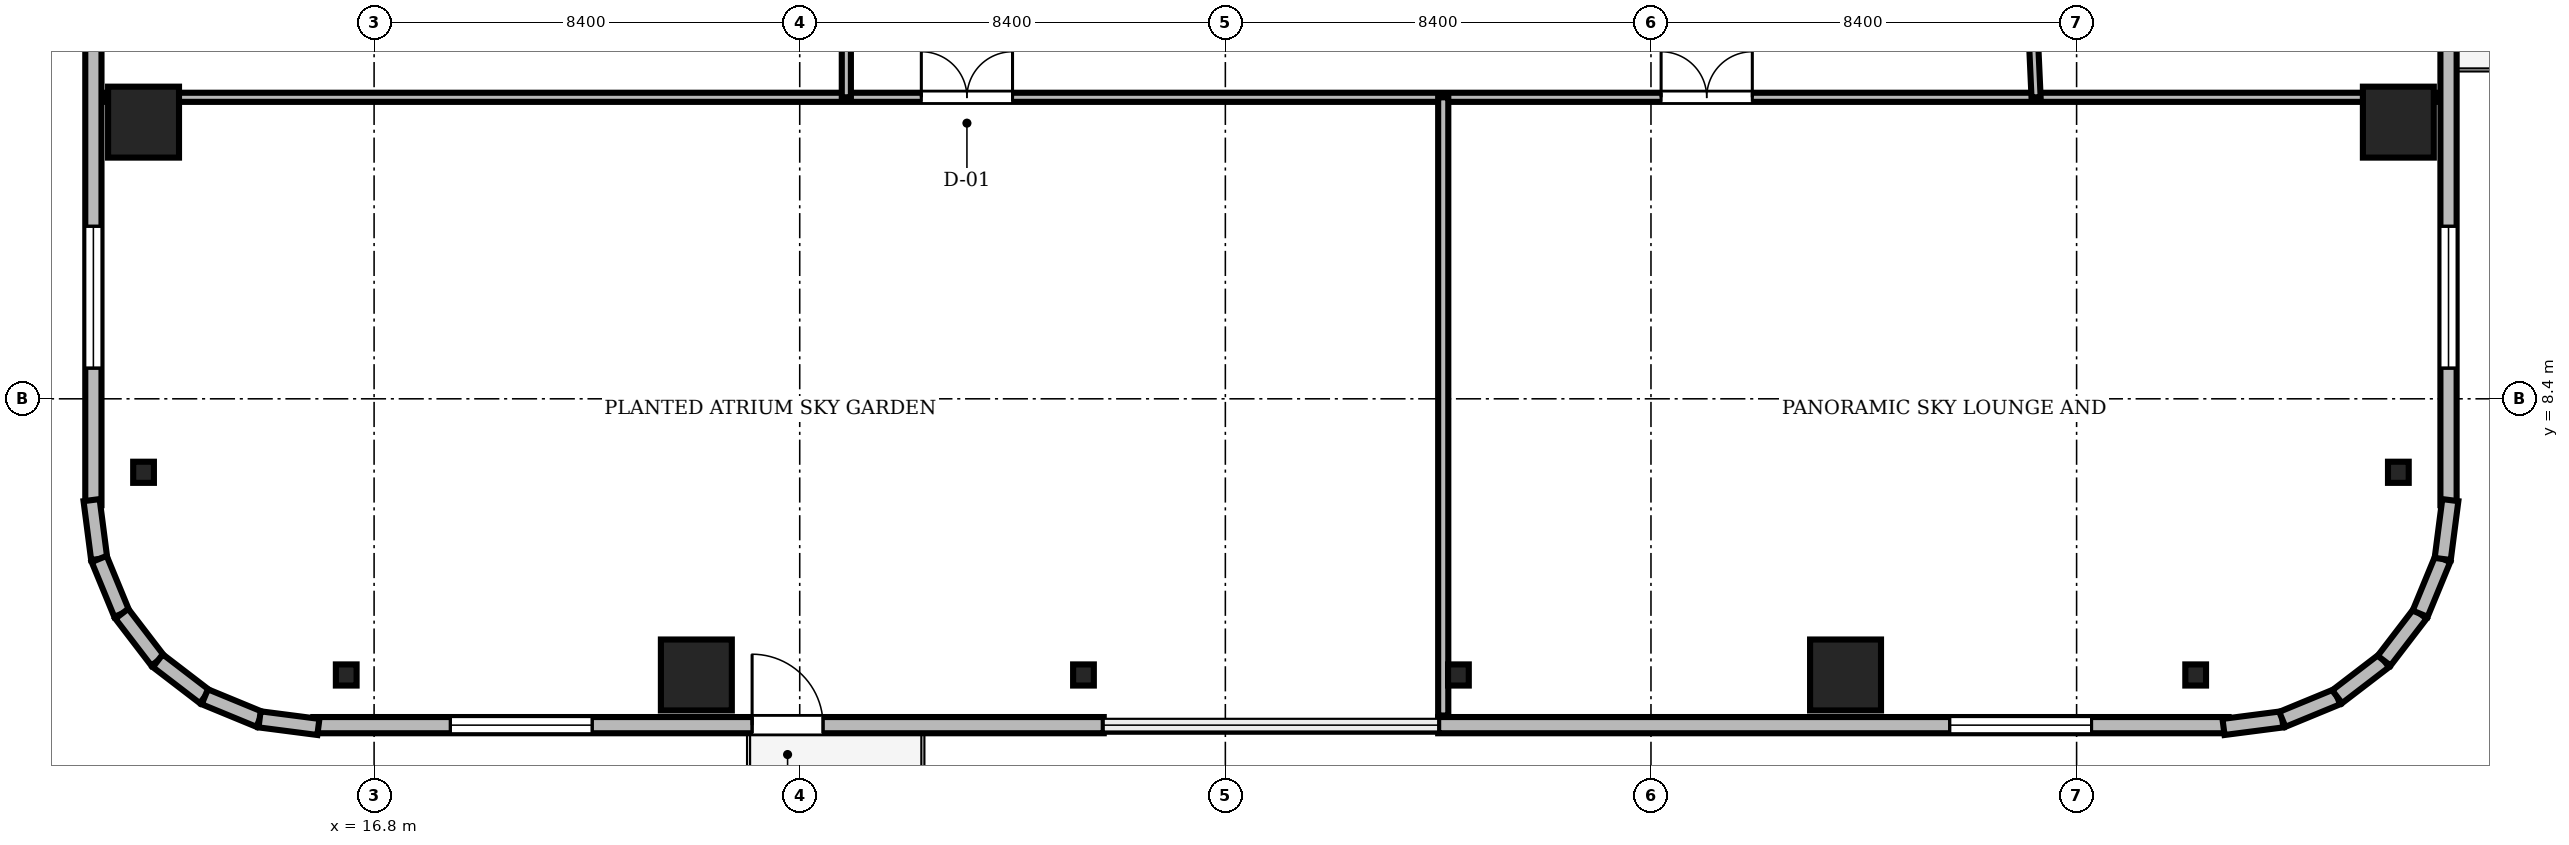
"""IFC4 building model, lengths in metres.
Left out: names, types, materials, properties, quantities, classifications, styles, units other than length and angle.
Written with IfcOpenShell. Run it as: python <this file> out.ifc"""

import sys

from ifc_helpers import new_model, si_unit, direction, frame, frame_2d, origin, origin_2d, place, context, subcontext, project, spatial, rectangle, i_section, extrude, source, transform, mapped, element, fill, save


model = new_model("IFC4")
c1 = context("Model", 3, precision=1e-05, world=origin(), true_north=direction((0.0, 1.0)))
c2 = subcontext(c1, "Body", "Model", "MODEL_VIEW")
j1 = project(units=[si_unit("LENGTHUNIT", "METRE"), si_unit("PLANEANGLEUNIT", "RADIAN")], contexts=[c1])
p1 = place(None, origin())
s1 = spatial("IfcSite", under=j1, at=p1, CompositionType="ELEMENT")
p2 = place(p1, origin())
s2 = spatial("IfcBuilding", under=s1, at=p2, CompositionType="ELEMENT")
p3 = place(p2, frame((0.0, 0.0, 172.2)))
s3 = spatial("IfcBuildingStorey", under=s2, at=p3, CompositionType="ELEMENT", Elevation=172.2)
m1 = source(origin(), c2, "Body", "SweptSolid", [
    extrude(rectangle(XDim=1.4, YDim=1.4, at=origin_2d()), origin(), (0.0, 0.0, 1.0), 4.78),
])
for number, where, z_axis, x_axis in (
    (1, (23.16, 2.95, 0.0), (0.0, 0.0, 1.0), (1.0, 0.0, 0.0)),
    (2, (45.84, 2.95, 0.0), (0.0, 0.0, 1.0), (1.0, 0.0, 0.0)),
    (3, (56.75, 13.86, 0.0), (0.0, 0.0, 1.0), (1.0, 0.0, 0.0)),
    (4, (12.25, 13.86, 0.0), (0.0, 0.0, 1.0), (1.0, 0.0, 0.0)),
):
    element("IfcColumn", number, at=place(p3, frame(where, z_axis=z_axis, x_axis=x_axis)), inside=s3, PredefinedType="COLUMN", context=c2, shape_type="MappedRepresentation", body=[
        mapped(m1, transform((0.0, 0.0, 0.0), scale=1.0)),
    ])
m2 = source(origin(), c2, "Body", "SweptSolid", [
    extrude(i_section(OverallWidth=0.409, OverallDepth=0.417, WebThickness=0.021, FlangeThickness=0.033, FilletRadius=0.015, at=origin_2d()), origin(), (0.0, 0.0, 1.0), 4.78),
])
for number, where, z_axis, x_axis in (
    (5, (16.25, 2.95, 0.0), (0.0, 0.0, 1.0), (1.0, 0.0, 0.0)),
    (6, (30.8, 2.95, 0.0), (0.0, 0.0, 1.0), (1.0, 0.0, 0.0)),
    (7, (38.2, 2.95, 0.0), (0.0, 0.0, 1.0), (1.0, 0.0, 0.0)),
    (8, (52.75, 2.95, 0.0), (0.0, 0.0, 1.0), (1.0, 0.0, 0.0)),
    (9, (56.75, 6.95, 0.0), (0.0, 0.0, 1.0), (1.0, 0.0, 0.0)),
    (10, (12.25, 6.95, 0.0), (0.0, 0.0, 1.0), (1.0, 0.0, 0.0)),
):
    element("IfcColumn", number, at=place(p3, frame(where, z_axis=z_axis, x_axis=x_axis)), inside=s3, PredefinedType="COLUMN", context=c2, shape_type="MappedRepresentation", body=[
        mapped(m2, transform((0.0, 0.0, 0.0), scale=1.0)),
    ])
m3 = source(origin(), c2, "Body", "SweptSolid", [
    extrude(rectangle(XDim=15.6, YDim=0.32, at=frame_2d((7.8, 0.0))), origin(), (0.0, 0.0, 1.0), 4.78),
])
p4 = place(p3, frame((15.6, 1.96, 0.0), z_axis=(0.0, 0.0, 1.0), x_axis=(1.0, 0.0, 0.0)))
e11 = element("IfcWall", 11, at=p4, inside=s3, PredefinedType="SOLIDWALL", context=c2, shape_type="MappedRepresentation", body=[
    mapped(m3, transform((0.0, 0.0, 0.0), scale=1.0)),
])
m4 = source(origin(), c2, "Body", "SweptSolid", [
    extrude(rectangle(XDim=1.4, YDim=2.3, at=frame_2d((0.7, 1.15))), frame((0.0, 0.17, 0.0), z_axis=(0.0, -1.0, 0.0), x_axis=(1.0, 0.0, 0.0)), (0.0, 0.0, 1.0), 0.34),
])
p5 = place(p4, frame((8.66, 0.0, 0.0)))
e12 = element("IfcOpeningElement", 12, at=p5, cuts=e11, PredefinedType="OPENING", context=c2, shape_type="MappedRepresentation", body=[
    mapped(m4, transform((0.0, 0.0, 0.0), scale=1.0)),
])
m5 = source(origin(), c2, "Body", "SweptSolid", [
    extrude(rectangle(XDim=2.8, YDim=2.4, at=frame_2d((1.4, 1.2))), frame((0.0, 0.17, 0.0), z_axis=(0.0, -1.0, 0.0), x_axis=(1.0, 0.0, 0.0)), (0.0, 0.0, 1.0), 0.34),
])
p6 = place(p4, frame((2.705, 0.0, 0.72)))
e13 = element("IfcOpeningElement", 13, at=p6, cuts=e11, PredefinedType="OPENING", context=c2, shape_type="MappedRepresentation", body=[
    mapped(m5, transform((0.0, 0.0, 0.0), scale=1.0)),
])
p7 = place(p3, frame((37.8, 1.96, 0.0), z_axis=(0.0, 0.0, 1.0), x_axis=(1.0, 0.0, 0.0)))
e14 = element("IfcWall", 14, at=p7, inside=s3, PredefinedType="SOLIDWALL", context=c2, shape_type="MappedRepresentation", body=[
    mapped(m3, transform((0.0, 0.0, 0.0), scale=1.0)),
])
p8 = place(p7, frame((10.095, 0.0, 0.72)))
e15 = element("IfcOpeningElement", 15, at=p8, cuts=e14, PredefinedType="OPENING", context=c2, shape_type="MappedRepresentation", body=[
    mapped(m5, transform((0.0, 0.0, 0.0), scale=1.0)),
])
p9 = place(p3, frame((11.26, 21.9, 0.0), z_axis=(0.0, 0.0, 1.0), x_axis=(0.0, -1.0, 0.0)))
e16 = element("IfcWall", 16, at=p9, inside=s3, PredefinedType="SOLIDWALL", context=c2, shape_type="MappedRepresentation", body=[
    mapped(m3, transform((0.0, 0.0, 0.0), scale=1.0)),
])
p10 = place(p9, frame((10.095, 0.0, 0.72)))
e17 = element("IfcOpeningElement", 17, at=p10, cuts=e16, PredefinedType="OPENING", context=c2, shape_type="MappedRepresentation", body=[
    mapped(m5, transform((0.0, 0.0, 0.0), scale=1.0)),
])
p11 = place(p3, frame((57.74, 6.3, 0.0), z_axis=(0.0, 0.0, 1.0), x_axis=(0.0, 1.0, 0.0)))
e18 = element("IfcWall", 18, at=p11, inside=s3, PredefinedType="SOLIDWALL", context=c2, shape_type="MappedRepresentation", body=[
    mapped(m3, transform((0.0, 0.0, 0.0), scale=1.0)),
])
p12 = place(p11, frame((9.61, 0.0, 0.0)))
e19 = element("IfcOpeningElement", 19, at=p12, cuts=e18, PredefinedType="OPENING", context=c2, shape_type="MappedRepresentation", body=[
    mapped(m4, transform((0.0, 0.0, 0.0), scale=1.0)),
])
p13 = place(p11, frame((2.705, 0.0, 0.72)))
e20 = element("IfcOpeningElement", 20, at=p13, cuts=e18, PredefinedType="OPENING", context=c2, shape_type="MappedRepresentation", body=[
    mapped(m5, transform((0.0, 0.0, 0.0), scale=1.0)),
])
m6 = source(origin(), c2, "Body", "SweptSolid", [
    extrude(rectangle(XDim=1.171, YDim=0.32, at=frame_2d((0.585, 0.0))), origin(), (0.0, 0.0, 1.0), 4.78),
])
p14 = place(p3, frame((11.224, 6.401, 0.0), z_axis=(0.0, 0.0, 1.0), x_axis=(0.128269133229, -0.991739395941, 0.0)))
e21 = element("IfcWall", 21, at=p14, inside=s3, PredefinedType="SOLIDWALL", context=c2, shape_type="MappedRepresentation", body=[
    mapped(m6, transform((0.0, 0.0, 0.0), scale=1.0)),
])
m7 = source(origin(), c2, "Body", "SweptSolid", [
    extrude(rectangle(XDim=1.169, YDim=0.32, at=frame_2d((0.584, 0.0))), origin(), (0.0, 0.0, 1.0), 4.78),
])
for number, where, z_axis, x_axis in (
    (22, (11.375, 5.24, 0.0), (0.0, 0.0, 1.0), (0.381, -0.925, 0.0)),
    (23, (11.82, 4.159, 0.0), (0.0, 0.0, 1.0), (0.608, -0.794, 0.0)),
):
    element("IfcWall", number, at=place(p3, frame(where, z_axis=z_axis, x_axis=x_axis)), inside=s3, PredefinedType="SOLIDWALL", context=c2, shape_type="MappedRepresentation", body=[
        mapped(m7, transform((0.0, 0.0, 0.0), scale=1.0)),
    ])
m8 = source(origin(), c2, "Body", "SweptSolid", [
    extrude(rectangle(XDim=1.169, YDim=0.32, at=frame_2d((0.584, 0.0))), origin(), (0.0, 0.0, 1.0), 4.78),
])
p15 = place(p3, frame((12.531, 3.231, 0.0), z_axis=(0.0, 0.0, 1.0), x_axis=(0.793663520347, -0.608356981114, 0.0)))
e24 = element("IfcWall", 24, at=p15, inside=s3, PredefinedType="SOLIDWALL", context=c2, shape_type="MappedRepresentation", body=[
    mapped(m8, transform((0.0, 0.0, 0.0), scale=1.0)),
])
m9 = source(origin(), c2, "Body", "SweptSolid", [
    extrude(rectangle(XDim=1.169, YDim=0.32, at=frame_2d((0.585, 0.0))), origin(), (0.0, 0.0, 1.0), 4.78),
])
p16 = place(p3, frame((13.459, 2.52, 0.0), z_axis=(0.0, 0.0, 1.0), x_axis=(0.924479075121, -0.381232789334, 0.0)))
e25 = element("IfcWall", 25, at=p16, inside=s3, PredefinedType="SOLIDWALL", context=c2, shape_type="MappedRepresentation", body=[
    mapped(m9, transform((0.0, 0.0, 0.0), scale=1.0)),
])
m10 = source(origin(), c2, "Body", "SweptSolid", [
    extrude(rectangle(XDim=1.17, YDim=0.32, at=frame_2d((0.585, 0.0))), origin(), (0.0, 0.0, 1.0), 4.78),
])
for number, where, z_axis, x_axis in (
    (26, (14.54, 2.074, 0.0), (0.0, 0.0, 1.0), (0.992, -0.128, 0.0)),
    (27, (53.3, 1.925, 0.0), (0.0, 0.0, 1.0), (0.992, 0.128, 0.0)),
):
    element("IfcWall", number, at=place(p3, frame(where, z_axis=z_axis, x_axis=x_axis)), inside=s3, PredefinedType="SOLIDWALL", context=c2, shape_type="MappedRepresentation", body=[
        mapped(m10, transform((0.0, 0.0, 0.0), scale=1.0)),
    ])
p17 = place(p3, frame((54.46, 2.074, 0.0), z_axis=(0.0, 0.0, 1.0), x_axis=(0.924479075121, 0.381232789334, 0.0)))
e28 = element("IfcWall", 28, at=p17, inside=s3, PredefinedType="SOLIDWALL", context=c2, shape_type="MappedRepresentation", body=[
    mapped(m9, transform((0.0, 0.0, 0.0), scale=1.0)),
])
p18 = place(p3, frame((55.541, 2.52, 0.0), z_axis=(0.0, 0.0, 1.0), x_axis=(0.793663520347, 0.608356981114, 0.0)))
e29 = element("IfcWall", 29, at=p18, inside=s3, PredefinedType="SOLIDWALL", context=c2, shape_type="MappedRepresentation", body=[
    mapped(m8, transform((0.0, 0.0, 0.0), scale=1.0)),
])
for number, where, z_axis, x_axis in (
    (30, (56.469, 3.231, 0.0), (0.0, 0.0, 1.0), (0.608, 0.794, 0.0)),
    (31, (57.18, 4.159, 0.0), (0.0, 0.0, 1.0), (0.381, 0.925, 0.0)),
):
    element("IfcWall", number, at=place(p3, frame(where, z_axis=z_axis, x_axis=x_axis)), inside=s3, PredefinedType="SOLIDWALL", context=c2, shape_type="MappedRepresentation", body=[
        mapped(m7, transform((0.0, 0.0, 0.0), scale=1.0)),
    ])
p19 = place(p3, frame((57.625, 5.24, 0.0), z_axis=(0.0, 0.0, 1.0), x_axis=(0.128269133229, 0.991739395941, 0.0)))
e32 = element("IfcWall", 32, at=p19, inside=s3, PredefinedType="SOLIDWALL", context=c2, shape_type="MappedRepresentation", body=[
    mapped(m6, transform((0.0, 0.0, 0.0), scale=1.0)),
])
m11 = source(origin(), c2, "Body", "SweptSolid", [
    extrude(rectangle(XDim=46.1, YDim=0.18, at=frame_2d((23.05, 0.0))), origin(), (0.0, 0.0, 1.0), 4.022),
])
p20 = place(p3, frame((11.45, 14.35, 0.0), z_axis=(0.0, 0.0, 1.0), x_axis=(1.0, 0.0, 0.0)))
e33 = element("IfcWall", 33, at=p20, inside=s3, PredefinedType="PARTITIONING", context=c2, shape_type="MappedRepresentation", body=[
    mapped(m11, transform((0.0, 0.0, 0.0), scale=1.0)),
])
m12 = source(origin(), c2, "Body", "SweptSolid", [
    extrude(rectangle(XDim=1.8, YDim=2.4, at=frame_2d((0.9, 1.2))), frame((0.0, 0.1, 0.0), z_axis=(0.0, -1.0, 0.0), x_axis=(1.0, 0.0, 0.0)), (0.0, 0.0, 1.0), 0.2),
])
p21 = place(p20, frame((16.15, 0.0, 0.0)))
e34 = element("IfcOpeningElement", 34, at=p21, cuts=e33, PredefinedType="OPENING", context=c2, shape_type="MappedRepresentation", body=[
    mapped(m12, transform((0.0, 0.0, 0.0), scale=1.0)),
])
p22 = place(p20, frame((30.75, 0.0, 0.0)))
e35 = element("IfcOpeningElement", 35, at=p22, cuts=e33, PredefinedType="OPENING", context=c2, shape_type="MappedRepresentation", body=[
    mapped(m12, transform((0.0, 0.0, 0.0), scale=1.0)),
])
m13 = source(origin(), c2, "Body", "SweptSolid", [
    extrude(rectangle(XDim=26.557, YDim=0.18, at=frame_2d((13.278, 0.0))), origin(), (0.0, 0.0, 1.0), 4.222),
])
p23 = place(p3, frame((49.6, 14.35, 0.0), z_axis=(0.0, 0.0, 1.0), x_axis=(-0.045193318299, 0.998978260014, 0.0)))
e36 = element("IfcWall", 36, at=p23, inside=s3, PredefinedType="PARTITIONING", context=c2, shape_type="MappedRepresentation", body=[
    mapped(m13, transform((0.0, 0.0, 0.0), scale=1.0)),
])
p24 = place(p23, frame((2.4, 0.0, 0.0)))
e37 = element("IfcOpeningElement", 37, at=p24, cuts=e36, PredefinedType="OPENING", context=c2, shape_type="MappedRepresentation", body=[
    mapped(m12, transform((0.0, 0.0, 0.0), scale=1.0)),
])
m14 = source(origin(), c2, "Body", "SweptSolid", [
    extrude(rectangle(XDim=1.05, YDim=2.2, at=frame_2d((0.525, 1.1))), frame((0.0, 0.1, 0.0), z_axis=(0.0, -1.0, 0.0), x_axis=(1.0, 0.0, 0.0)), (0.0, 0.0, 1.0), 0.2),
])
p25 = place(p23, frame((19.2, 0.0, 0.0)))
e38 = element("IfcOpeningElement", 38, at=p25, cuts=e36, PredefinedType="OPENING", context=c2, shape_type="MappedRepresentation", body=[
    mapped(m14, transform((0.0, 0.0, 0.0), scale=1.0)),
])
m15 = source(origin(), c2, "Body", "SweptSolid", [
    extrude(rectangle(XDim=13.9, YDim=0.18, at=frame_2d((6.95, 0.0))), origin(), (0.0, 0.0, 1.0), 4.222),
])
p26 = place(p3, frame((26.12, 14.35, 0.0), z_axis=(0.0, 0.0, 1.0), x_axis=(0.0, 1.0, 0.0)))
e39 = element("IfcWall", 39, at=p26, inside=s3, PredefinedType="PARTITIONING", context=c2, shape_type="MappedRepresentation", body=[
    mapped(m15, transform((0.0, 0.0, 0.0), scale=1.0)),
])
p27 = place(p26, frame((4.2, 0.0, 0.0)))
e40 = element("IfcOpeningElement", 40, at=p27, cuts=e39, PredefinedType="OPENING", context=c2, shape_type="MappedRepresentation", body=[
    mapped(m14, transform((0.0, 0.0, 0.0), scale=1.0)),
])
m16 = source(origin(), c2, "Body", "SweptSolid", [
    extrude(rectangle(XDim=12.2, YDim=0.2, at=frame_2d((6.1, 0.0))), origin(), (0.0, 0.0, 1.0), 4.022),
])
p28 = place(p3, frame((37.9, 2.15, 0.0), z_axis=(0.0, 0.0, 1.0), x_axis=(0.0, 1.0, 0.0)))
e41 = element("IfcWall", 41, at=p28, inside=s3, PredefinedType="PARTITIONING", context=c2, shape_type="MappedRepresentation", body=[
    mapped(m16, transform((0.0, 0.0, 0.0), scale=1.0)),
])
m17 = source(origin(), c2, "Body", "SweptSolid", [
    extrude(rectangle(XDim=1.4, YDim=2.3, at=frame_2d((0.7, 1.15))), frame((0.0, 0.025, 0.0), z_axis=(0.0, -1.0, 0.0), x_axis=(1.0, 0.0, 0.0)), (0.0, 0.0, 1.0), 0.05),
])
p29 = place(p5, frame((1.4, 0.0, 0.0), z_axis=(0.0, 0.0, 1.0), x_axis=(-1.0, 0.0, 0.0)))
e42 = element("IfcDoor", 42, at=p29, inside=s3, OperationType="DOUBLE_DOOR_SLIDING", PredefinedType="DOOR", context=c2, shape_type="MappedRepresentation", body=[
    mapped(m17, transform((0.0, 0.0, 0.0), scale=1.0)),
])
fill(e12, e42)
m18 = source(origin(), c2, "Body", "SweptSolid", [
    extrude(rectangle(XDim=2.8, YDim=2.4, at=frame_2d((1.4, 1.2))), frame((0.0, 0.03, 0.0), z_axis=(0.0, -1.0, 0.0), x_axis=(1.0, 0.0, 0.0)), (0.0, 0.0, 1.0), 0.06),
])
p30 = place(p6, origin())
e43 = element("IfcWindow", 43, at=p30, inside=s3, PartitioningType="SINGLE_PANEL", PredefinedType="WINDOW", context=c2, shape_type="MappedRepresentation", body=[
    mapped(m18, transform((0.0, 0.0, 0.0), scale=1.0)),
])
fill(e13, e43)
p31 = place(p8, origin())
e44 = element("IfcWindow", 44, at=p31, inside=s3, PartitioningType="SINGLE_PANEL", PredefinedType="WINDOW", context=c2, shape_type="MappedRepresentation", body=[
    mapped(m18, transform((0.0, 0.0, 0.0), scale=1.0)),
])
fill(e15, e44)
p32 = place(p10, origin())
e45 = element("IfcWindow", 45, at=p32, inside=s3, PartitioningType="SINGLE_PANEL", PredefinedType="WINDOW", context=c2, shape_type="MappedRepresentation", body=[
    mapped(m18, transform((0.0, 0.0, 0.0), scale=1.0)),
])
fill(e17, e45)
p33 = place(p13, origin())
e46 = element("IfcWindow", 46, at=p33, inside=s3, PartitioningType="SINGLE_PANEL", PredefinedType="WINDOW", context=c2, shape_type="MappedRepresentation", body=[
    mapped(m18, transform((0.0, 0.0, 0.0), scale=1.0)),
])
fill(e20, e46)
m19 = source(origin(), c2, "Body", "SweptSolid", [
    extrude(rectangle(XDim=1.8, YDim=2.4, at=frame_2d((0.9, 1.2))), frame((0.0, 0.025, 0.0), z_axis=(0.0, -1.0, 0.0), x_axis=(1.0, 0.0, 0.0)), (0.0, 0.0, 1.0), 0.05),
])
p34 = place(p21, origin())
e47 = element("IfcDoor", 47, at=p34, inside=s3, OperationType="DOUBLE_DOOR_SINGLE_SWING", PredefinedType="DOOR", context=c2, shape_type="MappedRepresentation", body=[
    mapped(m19, transform((0.0, 0.0, 0.0), scale=1.0)),
])
fill(e34, e47)
p35 = place(p22, origin())
e48 = element("IfcDoor", 48, at=p35, inside=s3, OperationType="DOUBLE_DOOR_SINGLE_SWING", PredefinedType="DOOR", context=c2, shape_type="MappedRepresentation", body=[
    mapped(m19, transform((0.0, 0.0, 0.0), scale=1.0)),
])
fill(e35, e48)
save(model, sys.argv[1])
